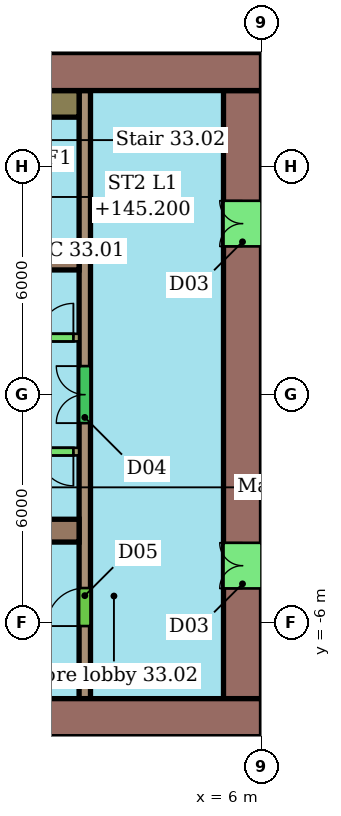
"""IFC4 building model, lengths in metres.
Left out: names, types, materials, properties, quantities, classifications, styles, units other than length and angle.
Written with IfcOpenShell. Run it as: python <this file> out.ifc"""

import sys

from ifc_helpers import new_model, si_unit, direction, frame, frame_2d, origin, place, context, subcontext, project, spatial, rectangle, extrude, element, fill, save


model = new_model("IFC4")
c1 = context("Model", 3, precision=1e-05, world=origin(), true_north=direction((0.0, 1.0)))
c2 = subcontext(c1, "Body", "Model", "MODEL_VIEW")
j1 = project(units=[si_unit("LENGTHUNIT", "METRE"), si_unit("PLANEANGLEUNIT", "RADIAN")], contexts=[c1])
p1 = place(None, origin())
s1 = spatial("IfcSite", under=j1, at=p1, CompositionType="ELEMENT")
p2 = place(p1, origin())
s2 = spatial("IfcBuilding", under=s1, at=p2, CompositionType="ELEMENT")
p3 = place(p2, frame((0.0, 0.0, 143.4)))
s3 = spatial("IfcBuildingStorey", under=s2, at=p3, CompositionType="ELEMENT", Elevation=143.4)
p4 = place(p3, frame((6.0, 8.5, 0.0), z_axis=(0.0, 0.0, 1.0), x_axis=(-1.0, 0.0, 0.0)))
e1 = element("IfcWall", 1, at=p4, inside=s3, PredefinedType="SHEAR", context=c2, shape_type="SweptSolid", body=[
    extrude(rectangle(XDim=12.0, YDim=1.0, at=frame_2d((6.0, 0.0))), origin(), (0.0, 0.0, 1.0), 3.3),
])
p5 = place(p4, frame((5.6, 0.0, 0.0)))
e2 = element("IfcOpeningElement", 2, at=p5, cuts=e1, PredefinedType="OPENING", context=c2, shape_type="SweptSolid", body=[
    extrude(rectangle(XDim=1.2, YDim=2.1, at=frame_2d((0.6, 1.05))), frame((0.0, 0.51, 0.0), z_axis=(0.0, -1.0, 0.0), x_axis=(1.0, 0.0, 0.0)), (0.0, 0.0, 1.0), 1.02),
])
p6 = place(p3, frame((-18.0, -8.5, 0.0), z_axis=(0.0, 0.0, 1.0), x_axis=(1.0, 0.0, 0.0)))
e3 = element("IfcWall", 3, at=p6, inside=s3, PredefinedType="SHEAR", context=c2, shape_type="SweptSolid", body=[
    extrude(rectangle(XDim=24.0, YDim=1.0, at=frame_2d((12.0, 0.0))), origin(), (0.0, 0.0, 1.0), 3.3),
])
p7 = place(p6, frame((6.0, 0.0, 0.0)))
e4 = element("IfcOpeningElement", 4, at=p7, cuts=e3, PredefinedType="OPENING", context=c2, shape_type="SweptSolid", body=[
    extrude(rectangle(XDim=1.2, YDim=2.1, at=frame_2d((0.6, 1.05))), frame((0.0, 0.51, 0.0), z_axis=(0.0, -1.0, 0.0), x_axis=(1.0, 0.0, 0.0)), (0.0, 0.0, 1.0), 1.02),
])
p8 = place(p3, frame((5.5, -8.0, 0.0), z_axis=(0.0, 0.0, 1.0), x_axis=(0.0, 1.0, 0.0)))
e5 = element("IfcWall", 5, at=p8, inside=s3, PredefinedType="SHEAR", context=c2, shape_type="SweptSolid", body=[
    extrude(rectangle(XDim=16.0, YDim=1.0, at=frame_2d((8.0, 0.0))), origin(), (0.0, 0.0, 1.0), 3.3),
])
p9 = place(p8, frame((2.9, 0.0, 0.0)))
e6 = element("IfcOpeningElement", 6, at=p9, cuts=e5, PredefinedType="OPENING", context=c2, shape_type="SweptSolid", body=[
    extrude(rectangle(XDim=1.2, YDim=2.1, at=frame_2d((0.6, 1.05))), frame((0.0, 0.51, 0.0), z_axis=(0.0, -1.0, 0.0), x_axis=(1.0, 0.0, 0.0)), (0.0, 0.0, 1.0), 1.02),
])
p10 = place(p8, frame((11.9, 0.0, 0.0)))
e7 = element("IfcOpeningElement", 7, at=p10, cuts=e5, PredefinedType="OPENING", context=c2, shape_type="SweptSolid", body=[
    extrude(rectangle(XDim=1.2, YDim=2.1, at=frame_2d((0.6, 1.05))), frame((0.0, 0.51, 0.0), z_axis=(0.0, -1.0, 0.0), x_axis=(1.0, 0.0, 0.0)), (0.0, 0.0, 1.0), 1.02),
])
for number, where, z_axis, x_axis in (
    (8, (-6.0, 3.58, 0.0), (0.0, 0.0, 1.0), (1.0, 0.0, 0.0)),
    (9, (-6.0, -3.58, 0.0), (0.0, 0.0, 1.0), (1.0, 0.0, 0.0)),
):
    element("IfcWall", number, at=place(p3, frame(where, z_axis=z_axis, x_axis=x_axis)), inside=s3, PredefinedType="SHEAR", context=c2, shape_type="SweptSolid", body=[
        extrude(rectangle(XDim=7.2, YDim=0.6, at=frame_2d((3.6, 0.0))), origin(), (0.0, 0.0, 1.0), 3.3),
    ])
p11 = place(p3, frame((1.35, -8.0, 0.0), z_axis=(0.0, 0.0, 1.0), x_axis=(0.0, 1.0, 0.0)))
e10 = element("IfcWall", 10, at=p11, inside=s3, PredefinedType="SHEAR", context=c2, shape_type="SweptSolid", body=[
    extrude(rectangle(XDim=16.0, YDim=0.3, at=frame_2d((8.0, 0.0))), origin(), (0.0, 0.0, 1.0), 3.3),
])
p12 = place(p11, frame((1.91, 0.0, 0.0)))
e11 = element("IfcOpeningElement", 11, at=p12, cuts=e10, PredefinedType="OPENING", context=c2, shape_type="SweptSolid", body=[
    extrude(rectangle(XDim=1.0, YDim=2.1, at=frame_2d((0.5, 1.05))), frame((0.0, 0.16, 0.0), z_axis=(0.0, -1.0, 0.0), x_axis=(1.0, 0.0, 0.0)), (0.0, 0.0, 1.0), 0.32),
])
p13 = place(p11, frame((7.25, 0.0, 0.0)))
e12 = element("IfcOpeningElement", 12, at=p13, cuts=e10, PredefinedType="OPENING", context=c2, shape_type="SweptSolid", body=[
    extrude(rectangle(XDim=1.5, YDim=2.1, at=frame_2d((0.75, 1.05))), frame((0.0, 0.16, 0.0), z_axis=(0.0, -1.0, 0.0), x_axis=(1.0, 0.0, 0.0)), (0.0, 0.0, 1.0), 0.32),
])
p14 = place(p3, frame((-13.2, 1.5, 0.0), z_axis=(0.0, 0.0, 1.0), x_axis=(1.0, 0.0, 0.0)))
e13 = element("IfcWall", 13, at=p14, inside=s3, PredefinedType="SHEAR", context=c2, shape_type="SweptSolid", body=[
    extrude(rectangle(XDim=14.4, YDim=0.2, at=frame_2d((7.2, 0.0))), origin(), (0.0, 0.0, 1.0), 3.3),
])
p15 = place(p14, frame((0.546, 0.0, 0.0)))
e14 = element("IfcOpeningElement", 14, at=p15, cuts=e13, PredefinedType="OPENING", context=c2, shape_type="SweptSolid", body=[
    extrude(rectangle(XDim=1.1, YDim=2.1, at=frame_2d((0.55, 1.05))), frame((0.0, 0.11, 0.0), z_axis=(0.0, -1.0, 0.0), x_axis=(1.0, 0.0, 0.0)), (0.0, 0.0, 1.0), 0.22),
])
p16 = place(p14, frame((2.988, 0.0, 0.0)))
e15 = element("IfcOpeningElement", 15, at=p16, cuts=e13, PredefinedType="OPENING", context=c2, shape_type="SweptSolid", body=[
    extrude(rectangle(XDim=1.1, YDim=2.1, at=frame_2d((0.55, 1.05))), frame((0.0, 0.11, 0.0), z_axis=(0.0, -1.0, 0.0), x_axis=(1.0, 0.0, 0.0)), (0.0, 0.0, 1.0), 0.22),
])
p17 = place(p14, frame((5.429, 0.0, 0.0)))
e16 = element("IfcOpeningElement", 16, at=p17, cuts=e13, PredefinedType="OPENING", context=c2, shape_type="SweptSolid", body=[
    extrude(rectangle(XDim=1.1, YDim=2.1, at=frame_2d((0.55, 1.05))), frame((0.0, 0.11, 0.0), z_axis=(0.0, -1.0, 0.0), x_axis=(1.0, 0.0, 0.0)), (0.0, 0.0, 1.0), 0.22),
])
p18 = place(p14, frame((7.871, 0.0, 0.0)))
e17 = element("IfcOpeningElement", 17, at=p18, cuts=e13, PredefinedType="OPENING", context=c2, shape_type="SweptSolid", body=[
    extrude(rectangle(XDim=1.1, YDim=2.1, at=frame_2d((0.55, 1.05))), frame((0.0, 0.11, 0.0), z_axis=(0.0, -1.0, 0.0), x_axis=(1.0, 0.0, 0.0)), (0.0, 0.0, 1.0), 0.22),
])
p19 = place(p14, frame((13.35, 0.0, 0.0)))
e18 = element("IfcOpeningElement", 18, at=p19, cuts=e13, PredefinedType="OPENING", context=c2, shape_type="SweptSolid", body=[
    extrude(rectangle(XDim=0.9, YDim=2.1, at=frame_2d((0.45, 1.05))), frame((0.0, 0.11, 0.0), z_axis=(0.0, -1.0, 0.0), x_axis=(1.0, 0.0, 0.0)), (0.0, 0.0, 1.0), 0.22),
])
p20 = place(p3, frame((1.2, -1.5, 0.0), z_axis=(0.0, 0.0, 1.0), x_axis=(-1.0, 0.0, 0.0)))
e19 = element("IfcWall", 19, at=p20, inside=s3, PredefinedType="SHEAR", context=c2, shape_type="SweptSolid", body=[
    extrude(rectangle(XDim=14.4, YDim=0.2, at=frame_2d((7.2, 0.0))), origin(), (0.0, 0.0, 1.0), 3.3),
])
p21 = place(p20, frame((7.821, 0.0, 0.0)))
e20 = element("IfcOpeningElement", 20, at=p21, cuts=e19, PredefinedType="OPENING", context=c2, shape_type="SweptSolid", body=[
    extrude(rectangle(XDim=1.2, YDim=2.1, at=frame_2d((0.6, 1.05))), frame((0.0, 0.11, 0.0), z_axis=(0.0, -1.0, 0.0), x_axis=(1.0, 0.0, 0.0)), (0.0, 0.0, 1.0), 0.22),
])
p22 = place(p20, frame((0.15, 0.0, 0.0)))
e21 = element("IfcOpeningElement", 21, at=p22, cuts=e19, PredefinedType="OPENING", context=c2, shape_type="SweptSolid", body=[
    extrude(rectangle(XDim=0.9, YDim=2.1, at=frame_2d((0.45, 1.05))), frame((0.0, 0.11, 0.0), z_axis=(0.0, -1.0, 0.0), x_axis=(1.0, 0.0, 0.0)), (0.0, 0.0, 1.0), 0.22),
])
p23 = place(p3, frame((0.4, 7.65, 0.0), z_axis=(0.0, 0.0, 1.0), x_axis=(1.0, 0.0, 0.0)))
e22 = element("IfcWall", 22, at=p23, inside=s3, PredefinedType="SHEAR", context=c2, shape_type="SweptSolid", body=[
    extrude(rectangle(XDim=0.8, YDim=0.7, at=frame_2d((0.4, 0.0))), origin(), (0.0, 0.0, 1.0), 3.3),
])
p24 = place(p9, origin())
e23 = element("IfcDoor", 23, at=p24, inside=s3, OperationType="DOUBLE_DOOR_SINGLE_SWING", PredefinedType="NOTDEFINED", context=c2, shape_type="SweptSolid", body=[
    extrude(rectangle(XDim=1.2, YDim=2.1, at=frame_2d((0.6, 1.05))), frame((0.0, 0.025, 0.0), z_axis=(0.0, -1.0, 0.0), x_axis=(1.0, 0.0, 0.0)), (0.0, 0.0, 1.0), 0.05),
])
fill(e6, e23)
p25 = place(p10, origin())
e24 = element("IfcDoor", 24, at=p25, inside=s3, OperationType="DOUBLE_DOOR_SINGLE_SWING", PredefinedType="NOTDEFINED", context=c2, shape_type="SweptSolid", body=[
    extrude(rectangle(XDim=1.2, YDim=2.1, at=frame_2d((0.6, 1.05))), frame((0.0, 0.025, 0.0), z_axis=(0.0, -1.0, 0.0), x_axis=(1.0, 0.0, 0.0)), (0.0, 0.0, 1.0), 0.05),
])
fill(e7, e24)
p26 = place(p12, origin())
e25 = element("IfcDoor", 25, at=p26, inside=s3, OperationType="SINGLE_SWING_LEFT", PredefinedType="NOTDEFINED", context=c2, shape_type="SweptSolid", body=[
    extrude(rectangle(XDim=1.0, YDim=2.1, at=frame_2d((0.5, 1.05))), frame((0.0, 0.025, 0.0), z_axis=(0.0, -1.0, 0.0), x_axis=(1.0, 0.0, 0.0)), (0.0, 0.0, 1.0), 0.05),
])
fill(e11, e25)
p27 = place(p13, origin())
e26 = element("IfcDoor", 26, at=p27, inside=s3, OperationType="DOUBLE_DOOR_SINGLE_SWING", PredefinedType="NOTDEFINED", context=c2, shape_type="SweptSolid", body=[
    extrude(rectangle(XDim=1.5, YDim=2.1, at=frame_2d((0.75, 1.05))), frame((0.0, 0.025, 0.0), z_axis=(0.0, -1.0, 0.0), x_axis=(1.0, 0.0, 0.0)), (0.0, 0.0, 1.0), 0.05),
])
fill(e12, e26)
p28 = place(p19, origin())
e27 = element("IfcDoor", 27, at=p28, inside=s3, OperationType="SINGLE_SWING_RIGHT", PredefinedType="NOTDEFINED", context=c2, shape_type="SweptSolid", body=[
    extrude(rectangle(XDim=0.9, YDim=2.1, at=frame_2d((0.45, 1.05))), frame((0.0, 0.025, 0.0), z_axis=(0.0, -1.0, 0.0), x_axis=(1.0, 0.0, 0.0)), (0.0, 0.0, 1.0), 0.05),
])
fill(e18, e27)
p29 = place(p22, origin())
e28 = element("IfcDoor", 28, at=p29, inside=s3, OperationType="SINGLE_SWING_LEFT", PredefinedType="NOTDEFINED", context=c2, shape_type="SweptSolid", body=[
    extrude(rectangle(XDim=0.9, YDim=2.1, at=frame_2d((0.45, 1.05))), frame((0.0, 0.025, 0.0), z_axis=(0.0, -1.0, 0.0), x_axis=(1.0, 0.0, 0.0)), (0.0, 0.0, 1.0), 0.05),
])
fill(e21, e28)
save(model, sys.argv[1])
